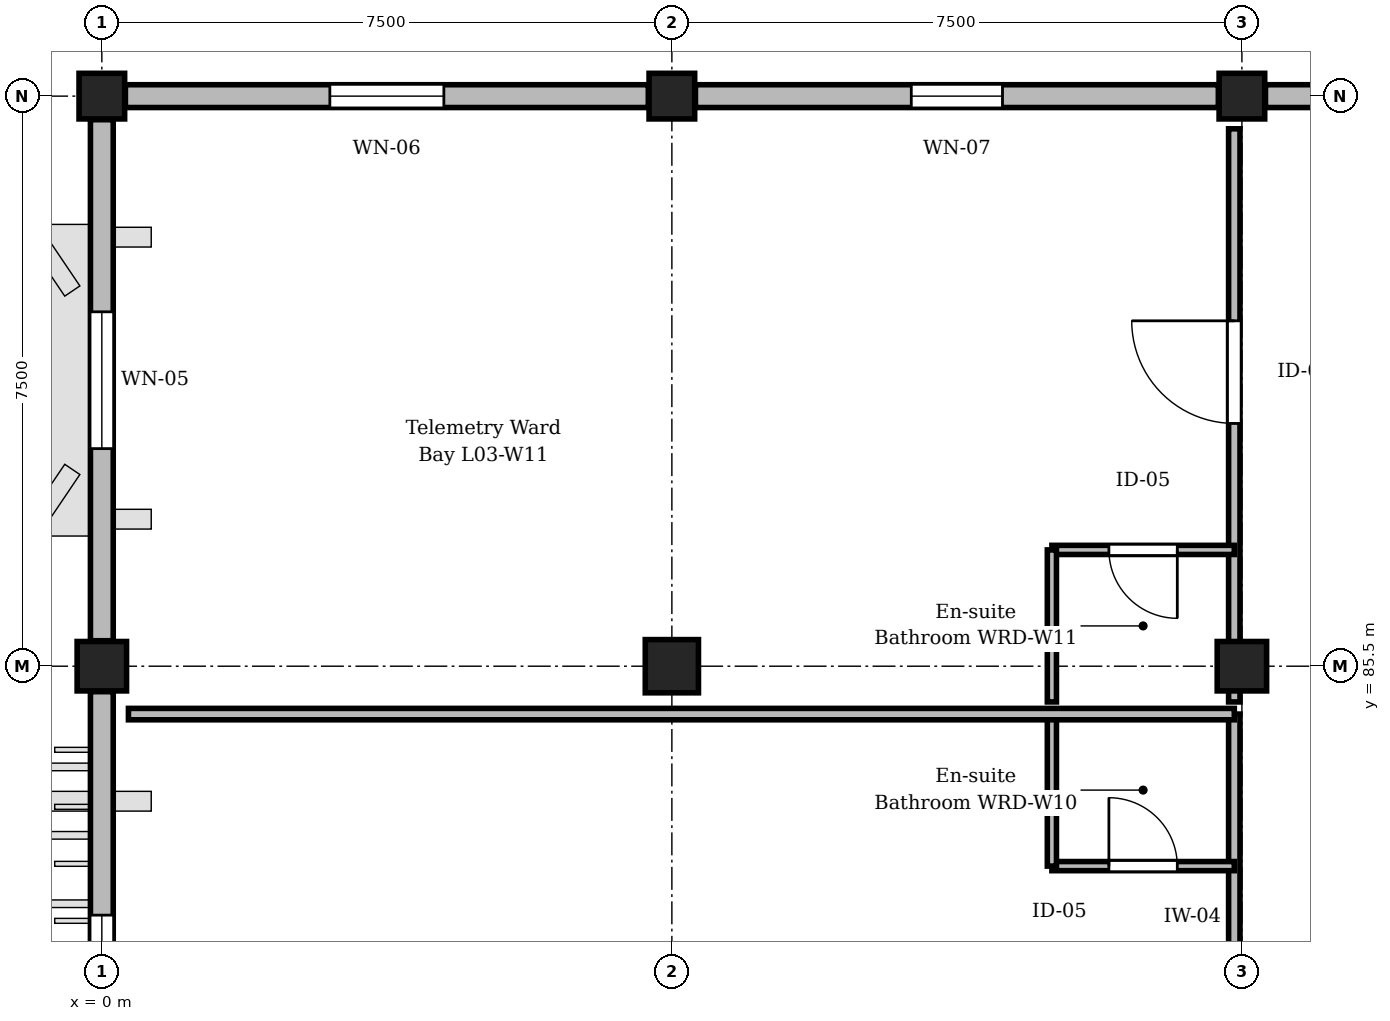
"""IFC4 building model, lengths in metres.
Left out: names, types, materials, properties, quantities, classifications, styles, units other than length and angle.
Written with IfcOpenShell. Run it as: python <this file> out.ifc"""

import sys

from ifc_helpers import new_model, si_unit, direction, frame, frame_2d, origin, origin_2d, place, context, subcontext, project, spatial, rectangle, circle, extrude, element, fill, save


model = new_model("IFC4")
c1 = context("Model", 3, precision=1e-05, world=origin(), true_north=direction((0.0, 1.0)))
c2 = subcontext(c1, "Body", "Model", "MODEL_VIEW")
j1 = project(units=[si_unit("LENGTHUNIT", "METRE"), si_unit("PLANEANGLEUNIT", "RADIAN")], contexts=[c1])
p1 = place(None, origin())
s1 = spatial("IfcSite", under=j1, at=p1, CompositionType="ELEMENT")
p2 = place(p1, origin())
s2 = spatial("IfcBuilding", under=s1, at=p2, CompositionType="ELEMENT")
p3 = place(p2, frame((0.0, 0.0, 14.1)))
s3 = spatial("IfcBuildingStorey", under=s2, at=p3, CompositionType="ELEMENT", Elevation=14.1)
p4 = place(p3, frame((0.0, 85.5, 0.0), z_axis=(0.0, 0.0, 1.0), x_axis=(1.0, 0.0, 0.0)))
e1 = element("IfcColumn", 1, at=p4, inside=s3, PredefinedType="COLUMN", context=c2, shape_type="SweptSolid", body=[
    extrude(rectangle(XDim=0.65, YDim=0.65, at=origin_2d()), origin(), (0.0, 0.0, 1.0), 3.75),
])
p5 = place(p3, frame((0.0, 93.0, 0.0), z_axis=(0.0, 0.0, 1.0), x_axis=(1.0, 0.0, 0.0)))
e2 = element("IfcColumn", 2, at=p5, inside=s3, PredefinedType="COLUMN", context=c2, shape_type="SweptSolid", body=[
    extrude(circle(Radius=0.3, at=origin_2d()), origin(), (0.0, 0.0, 1.0), 3.75),
])
p6 = place(p3, frame((7.5, 85.5, 0.0), z_axis=(0.0, 0.0, 1.0), x_axis=(1.0, 0.0, 0.0)))
e3 = element("IfcColumn", 3, at=p6, inside=s3, PredefinedType="COLUMN", context=c2, shape_type="SweptSolid", body=[
    extrude(rectangle(XDim=0.7, YDim=0.7, at=origin_2d()), origin(), (0.0, 0.0, 1.0), 3.75),
])
p7 = place(p3, frame((7.5, 93.0, 0.0), z_axis=(0.0, 0.0, 1.0), x_axis=(1.0, 0.0, 0.0)))
e4 = element("IfcColumn", 4, at=p7, inside=s3, PredefinedType="COLUMN", context=c2, shape_type="SweptSolid", body=[
    extrude(rectangle(XDim=0.6, YDim=0.6, at=origin_2d()), origin(), (0.0, 0.0, 1.0), 3.75),
])
p8 = place(p3, frame((15.0, 85.5, 0.0), z_axis=(0.0, 0.0, 1.0), x_axis=(1.0, 0.0, 0.0)))
e5 = element("IfcColumn", 5, at=p8, inside=s3, PredefinedType="COLUMN", context=c2, shape_type="SweptSolid", body=[
    extrude(rectangle(XDim=0.65, YDim=0.65, at=origin_2d()), origin(), (0.0, 0.0, 1.0), 3.75),
])
p9 = place(p3, frame((15.0, 93.0, 0.0), z_axis=(0.0, 0.0, 1.0), x_axis=(1.0, 0.0, 0.0)))
e6 = element("IfcColumn", 6, at=p9, inside=s3, PredefinedType="COLUMN", context=c2, shape_type="SweptSolid", body=[
    extrude(rectangle(XDim=0.6, YDim=0.6, at=origin_2d()), origin(), (0.0, 0.0, 1.0), 3.75),
])
p10 = place(p3, frame((0.0, 76.885, 0.0), z_axis=(0.0, 0.0, 1.0), x_axis=(0.0, 1.0, 0.0)))
e7 = element("IfcWall", 7, at=p10, inside=s3, PredefinedType="STANDARD", context=c2, shape_type="SweptSolid", body=[
    extrude(rectangle(XDim=8.28, YDim=0.3, at=frame_2d((4.14, 0.0))), origin(), (0.0, 0.0, 1.0), 2.92),
])
p11 = place(p10, frame((2.94, 0.0, 0.9)))
e8 = element("IfcOpeningElement", 8, at=p11, cuts=e7, PredefinedType="OPENING", context=c2, shape_type="SweptSolid", body=[
    extrude(rectangle(XDim=2.4, YDim=1.74, at=frame_2d((1.2, 0.87))), frame((0.0, 0.16, 0.0), z_axis=(0.0, -1.0, 0.0), x_axis=(1.0, 0.0, 0.0)), (0.0, 0.0, 1.0), 0.32),
])
p12 = place(p3, frame((0.31, 93.0, 0.0), z_axis=(0.0, 0.0, 1.0), x_axis=(1.0, 0.0, 0.0)))
e9 = element("IfcWall", 9, at=p12, inside=s3, PredefinedType="STANDARD", context=c2, shape_type="SweptSolid", body=[
    extrude(rectangle(XDim=6.88, YDim=0.3, at=frame_2d((3.44, 0.0))), origin(), (0.0, 0.0, 1.0), 2.87),
])
p13 = place(p12, frame((2.69, 0.0, 0.9)))
e10 = element("IfcOpeningElement", 10, at=p13, cuts=e9, PredefinedType="OPENING", context=c2, shape_type="SweptSolid", body=[
    extrude(rectangle(XDim=1.5, YDim=1.69, at=frame_2d((0.75, 0.845))), frame((0.0, 0.16, 0.0), z_axis=(0.0, -1.0, 0.0), x_axis=(1.0, 0.0, 0.0)), (0.0, 0.0, 1.0), 0.32),
])
p14 = place(p3, frame((0.0, 85.835, 0.0), z_axis=(0.0, 0.0, 1.0), x_axis=(0.0, 1.0, 0.0)))
e11 = element("IfcWall", 11, at=p14, inside=s3, PredefinedType="STANDARD", context=c2, shape_type="SweptSolid", body=[
    extrude(rectangle(XDim=6.855, YDim=0.3, at=frame_2d((3.427, 0.0))), origin(), (0.0, 0.0, 1.0), 2.87),
])
p15 = place(p14, frame((2.528, 0.0, 0.9)))
e12 = element("IfcOpeningElement", 12, at=p15, cuts=e11, PredefinedType="OPENING", context=c2, shape_type="SweptSolid", body=[
    extrude(rectangle(XDim=1.8, YDim=1.69, at=frame_2d((0.9, 0.845))), frame((0.0, 0.16, 0.0), z_axis=(0.0, -1.0, 0.0), x_axis=(1.0, 0.0, 0.0)), (0.0, 0.0, 1.0), 0.32),
])
p16 = place(p3, frame((7.81, 93.0, 0.0), z_axis=(0.0, 0.0, 1.0), x_axis=(1.0, 0.0, 0.0)))
e13 = element("IfcWall", 13, at=p16, inside=s3, PredefinedType="STANDARD", context=c2, shape_type="SweptSolid", body=[
    extrude(rectangle(XDim=6.88, YDim=0.3, at=frame_2d((3.44, 0.0))), origin(), (0.0, 0.0, 1.0), 2.87),
])
p17 = place(p16, frame((2.84, 0.0, 0.9)))
e14 = element("IfcOpeningElement", 14, at=p17, cuts=e13, PredefinedType="OPENING", context=c2, shape_type="SweptSolid", body=[
    extrude(rectangle(XDim=1.2, YDim=1.69, at=frame_2d((0.6, 0.845))), frame((0.0, 0.16, 0.0), z_axis=(0.0, -1.0, 0.0), x_axis=(1.0, 0.0, 0.0)), (0.0, 0.0, 1.0), 0.32),
])
p18 = place(p3, frame((15.31, 93.0, 0.0), z_axis=(0.0, 0.0, 1.0), x_axis=(1.0, 0.0, 0.0)))
e15 = element("IfcWall", 15, at=p18, inside=s3, PredefinedType="STANDARD", context=c2, shape_type="SweptSolid", body=[
    extrude(rectangle(XDim=6.88, YDim=0.3, at=frame_2d((3.44, 0.0))), origin(), (0.0, 0.0, 1.0), 2.87),
])
p19 = place(p18, frame((2.39, 0.0, 0.9)))
e16 = element("IfcOpeningElement", 16, at=p19, cuts=e15, PredefinedType="OPENING", context=c2, shape_type="SweptSolid", body=[
    extrude(rectangle(XDim=2.1, YDim=1.69, at=frame_2d((1.05, 0.845))), frame((0.0, 0.16, 0.0), z_axis=(0.0, -1.0, 0.0), x_axis=(1.0, 0.0, 0.0)), (0.0, 0.0, 1.0), 0.32),
])
p20 = place(p3, frame((14.9, 77.33, 0.0), z_axis=(0.0, 0.0, 1.0), x_axis=(0.0, 1.0, 0.0)))
e17 = element("IfcWall", 17, at=p20, inside=s3, PredefinedType="PARTITIONING", context=c2, shape_type="SweptSolid", body=[
    extrude(rectangle(XDim=7.54, YDim=0.15, at=frame_2d((3.77, 0.0))), origin(), (0.0, 0.0, 1.0), 2.755),
])
p21 = place(p20, frame((3.095, 0.0, 0.0)))
e18 = element("IfcOpeningElement", 18, at=p21, cuts=e17, PredefinedType="OPENING", context=c2, shape_type="SweptSolid", body=[
    extrude(rectangle(XDim=1.35, YDim=2.25, at=frame_2d((0.675, 1.125))), frame((0.0, 0.085, 0.0), z_axis=(0.0, -1.0, 0.0), x_axis=(1.0, 0.0, 0.0)), (0.0, 0.0, 1.0), 0.17),
])
p22 = place(p3, frame((12.5, 82.87, 0.0), z_axis=(0.0, 0.0, 1.0), x_axis=(1.0, 0.0, 0.0)))
e19 = element("IfcWall", 19, at=p22, inside=s3, PredefinedType="PARTITIONING", context=c2, shape_type="SweptSolid", body=[
    extrude(rectangle(XDim=2.4, YDim=0.12, at=frame_2d((1.2, 0.0))), origin(), (0.0, 0.0, 1.0), 3.455),
])
p23 = place(p22, frame((0.75, 0.0, 0.0)))
e20 = element("IfcOpeningElement", 20, at=p23, cuts=e19, PredefinedType="OPENING", context=c2, shape_type="SweptSolid", body=[
    extrude(rectangle(XDim=0.9, YDim=2.1, at=frame_2d((0.45, 1.05))), frame((0.0, 0.07, 0.0), z_axis=(0.0, -1.0, 0.0), x_axis=(1.0, 0.0, 0.0)), (0.0, 0.0, 1.0), 0.14),
])
p24 = place(p3, frame((12.5, 82.87, 0.0), z_axis=(0.0, 0.0, 1.0), x_axis=(0.0, 1.0, 0.0)))
e21 = element("IfcWall", 21, at=p24, inside=s3, PredefinedType="PARTITIONING", context=c2, shape_type="SweptSolid", body=[
    extrude(rectangle(XDim=2.0, YDim=0.12, at=frame_2d((1.0, 0.0))), origin(), (0.0, 0.0, 1.0), 3.455),
])
p25 = place(p3, frame((14.9, 85.03, 0.0), z_axis=(0.0, 0.0, 1.0), x_axis=(0.0, 1.0, 0.0)))
e22 = element("IfcWall", 22, at=p25, inside=s3, PredefinedType="PARTITIONING", context=c2, shape_type="SweptSolid", body=[
    extrude(rectangle(XDim=7.54, YDim=0.15, at=frame_2d((3.77, 0.0))), origin(), (0.0, 0.0, 1.0), 2.755),
])
p26 = place(p25, frame((3.664, 0.0, 0.0)))
e23 = element("IfcOpeningElement", 23, at=p26, cuts=e22, PredefinedType="OPENING", context=c2, shape_type="SweptSolid", body=[
    extrude(rectangle(XDim=1.35, YDim=2.25, at=frame_2d((0.675, 1.125))), frame((0.0, 0.085, 0.0), z_axis=(0.0, -1.0, 0.0), x_axis=(1.0, 0.0, 0.0)), (0.0, 0.0, 1.0), 0.17),
])
p27 = place(p3, frame((14.9, 87.03, 0.0), z_axis=(0.0, 0.0, 1.0), x_axis=(-1.0, 0.0, 0.0)))
e24 = element("IfcWall", 24, at=p27, inside=s3, PredefinedType="PARTITIONING", context=c2, shape_type="SweptSolid", body=[
    extrude(rectangle(XDim=2.4, YDim=0.12, at=frame_2d((1.2, 0.0))), origin(), (0.0, 0.0, 1.0), 3.455),
])
p28 = place(p27, frame((0.75, 0.0, 0.0)))
e25 = element("IfcOpeningElement", 25, at=p28, cuts=e24, PredefinedType="OPENING", context=c2, shape_type="SweptSolid", body=[
    extrude(rectangle(XDim=0.9, YDim=2.1, at=frame_2d((0.45, 1.05))), frame((0.0, 0.07, 0.0), z_axis=(0.0, -1.0, 0.0), x_axis=(1.0, 0.0, 0.0)), (0.0, 0.0, 1.0), 0.14),
])
p29 = place(p3, frame((12.5, 85.03, 0.0), z_axis=(0.0, 0.0, 1.0), x_axis=(0.0, 1.0, 0.0)))
e26 = element("IfcWall", 26, at=p29, inside=s3, PredefinedType="PARTITIONING", context=c2, shape_type="SweptSolid", body=[
    extrude(rectangle(XDim=2.0, YDim=0.12, at=frame_2d((1.0, 0.0))), origin(), (0.0, 0.0, 1.0), 3.455),
])
p30 = place(p3, frame((0.35, 84.87, 0.0), z_axis=(0.0, 0.0, 1.0), x_axis=(1.0, 0.0, 0.0)))
e27 = element("IfcWall", 27, at=p30, inside=s3, PredefinedType="PARTITIONING", context=c2, shape_type="SweptSolid", body=[
    extrude(rectangle(XDim=14.55, YDim=0.15, at=frame_2d((7.275, 0.0))), origin(), (0.0, 0.0, 1.0), 3.455),
])
p31 = place(p11, origin())
e28 = element("IfcWindow", 28, at=p31, inside=s3, PartitioningType="SINGLE_PANEL", PredefinedType="WINDOW", context=c2, shape_type="SweptSolid", body=[
    extrude(rectangle(XDim=2.4, YDim=1.74, at=frame_2d((1.2, 0.87))), frame((0.0, 0.03, 0.0), z_axis=(0.0, -1.0, 0.0), x_axis=(1.0, 0.0, 0.0)), (0.0, 0.0, 1.0), 0.06),
])
fill(e8, e28)
p32 = place(p13, origin())
e29 = element("IfcWindow", 29, at=p32, inside=s3, PartitioningType="SINGLE_PANEL", PredefinedType="WINDOW", context=c2, shape_type="SweptSolid", body=[
    extrude(rectangle(XDim=1.5, YDim=1.69, at=frame_2d((0.75, 0.845))), frame((0.0, 0.03, 0.0), z_axis=(0.0, -1.0, 0.0), x_axis=(1.0, 0.0, 0.0)), (0.0, 0.0, 1.0), 0.06),
])
fill(e10, e29)
p33 = place(p15, origin())
e30 = element("IfcWindow", 30, at=p33, inside=s3, PartitioningType="SINGLE_PANEL", PredefinedType="WINDOW", context=c2, shape_type="SweptSolid", body=[
    extrude(rectangle(XDim=1.8, YDim=1.69, at=frame_2d((0.9, 0.845))), frame((0.0, 0.03, 0.0), z_axis=(0.0, -1.0, 0.0), x_axis=(1.0, 0.0, 0.0)), (0.0, 0.0, 1.0), 0.06),
])
fill(e12, e30)
p34 = place(p17, origin())
e31 = element("IfcWindow", 31, at=p34, inside=s3, PartitioningType="SINGLE_PANEL", PredefinedType="WINDOW", context=c2, shape_type="SweptSolid", body=[
    extrude(rectangle(XDim=1.2, YDim=1.69, at=frame_2d((0.6, 0.845))), frame((0.0, 0.03, 0.0), z_axis=(0.0, -1.0, 0.0), x_axis=(1.0, 0.0, 0.0)), (0.0, 0.0, 1.0), 0.06),
])
fill(e14, e31)
p35 = place(p23, origin())
e32 = element("IfcDoor", 32, at=p35, inside=s3, OperationType="SINGLE_SWING_LEFT", PredefinedType="DOOR", context=c2, shape_type="SweptSolid", body=[
    extrude(rectangle(XDim=0.9, YDim=2.1, at=frame_2d((0.45, 1.05))), frame((0.0, 0.025, 0.0), z_axis=(0.0, -1.0, 0.0), x_axis=(1.0, 0.0, 0.0)), (0.0, 0.0, 1.0), 0.05),
])
fill(e20, e32)
p36 = place(p26, origin())
e33 = element("IfcDoor", 33, at=p36, inside=s3, OperationType="SINGLE_SWING_RIGHT", PredefinedType="DOOR", context=c2, shape_type="SweptSolid", body=[
    extrude(rectangle(XDim=1.35, YDim=2.25, at=frame_2d((0.675, 1.125))), frame((0.0, 0.025, 0.0), z_axis=(0.0, -1.0, 0.0), x_axis=(1.0, 0.0, 0.0)), (0.0, 0.0, 1.0), 0.05),
])
fill(e23, e33)
p37 = place(p28, origin())
e34 = element("IfcDoor", 34, at=p37, inside=s3, OperationType="SINGLE_SWING_LEFT", PredefinedType="DOOR", context=c2, shape_type="SweptSolid", body=[
    extrude(rectangle(XDim=0.9, YDim=2.1, at=frame_2d((0.45, 1.05))), frame((0.0, 0.025, 0.0), z_axis=(0.0, -1.0, 0.0), x_axis=(1.0, 0.0, 0.0)), (0.0, 0.0, 1.0), 0.05),
])
fill(e25, e34)
save(model, sys.argv[1])
